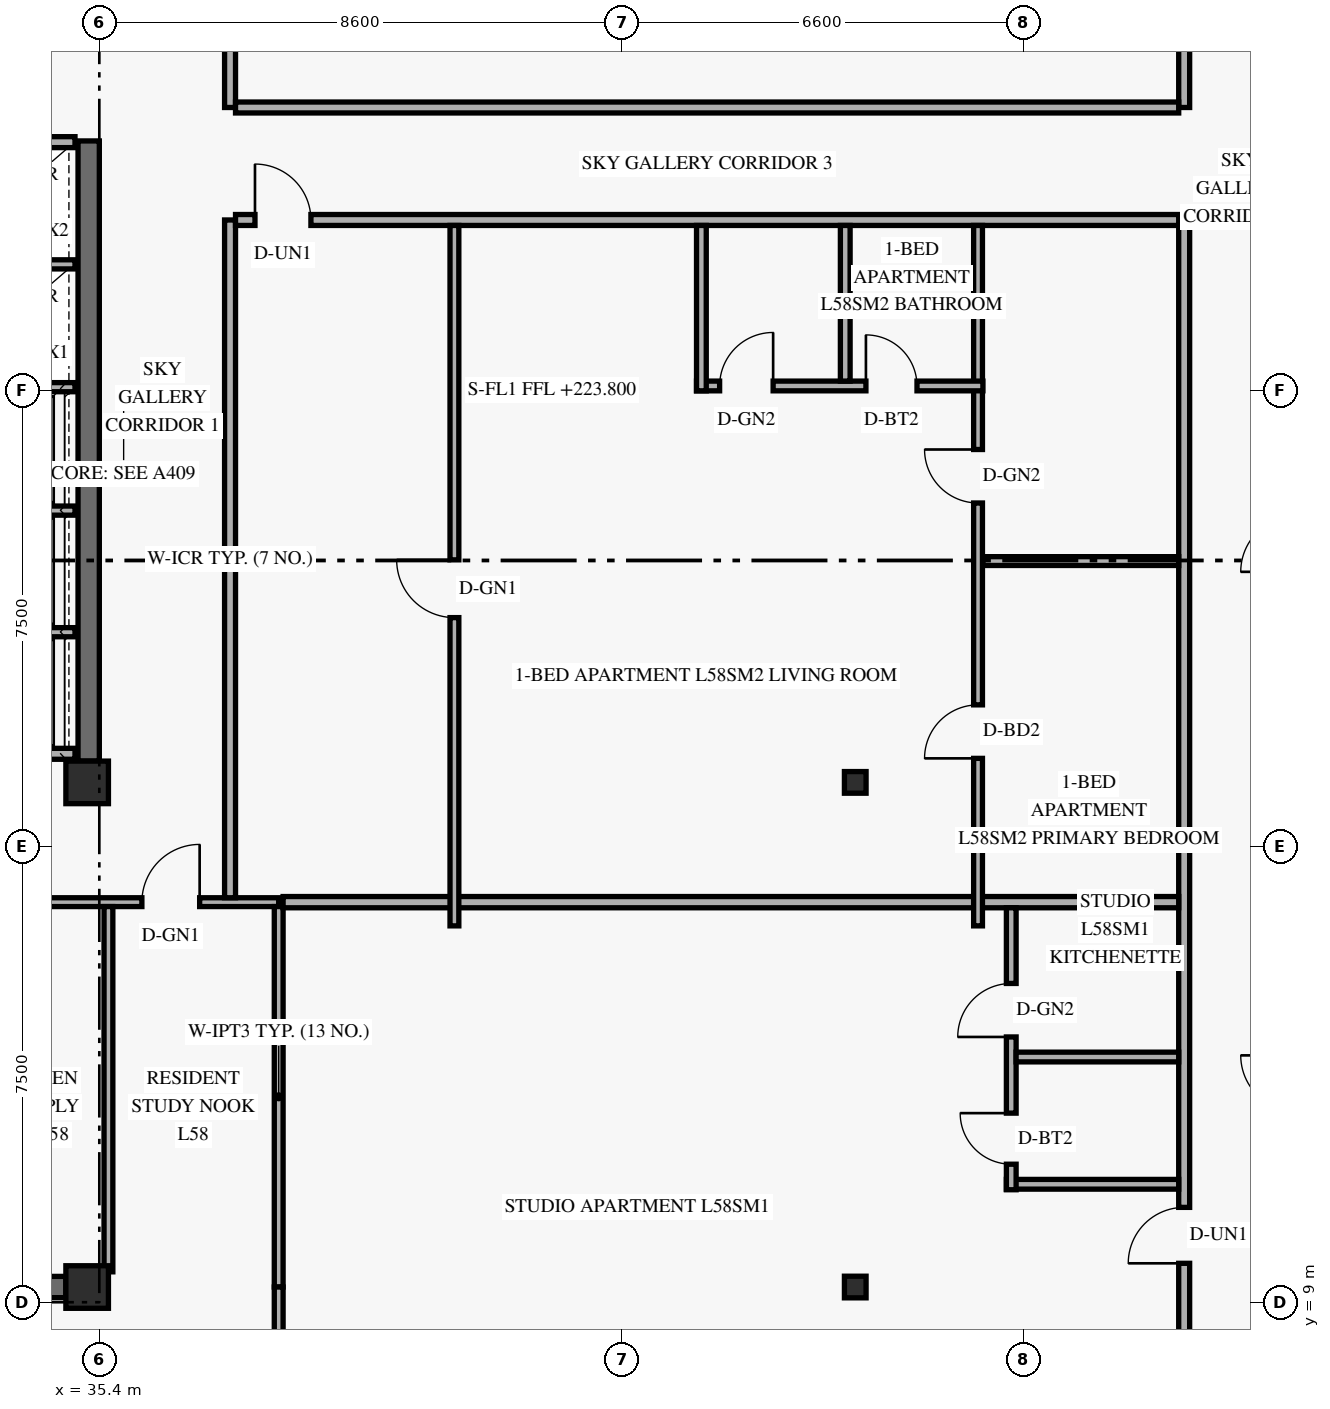
"""IFC4 building model, lengths in metres.
Left out: names, types, materials, properties, quantities, classifications, styles, units other than length and angle.
Written with IfcOpenShell. Run it as: python <this file> out.ifc"""

import sys

from ifc_helpers import new_model, si_unit, direction, frame, frame_2d, origin, origin_2d, place, context, subcontext, project, spatial, rectangle, hollow_rectangle, extrude, element, fill, save


model = new_model("IFC4")
c1 = context("Model", 3, precision=1e-05, world=origin(), true_north=direction((0.0, 1.0)))
c2 = subcontext(c1, "Body", "Model", "MODEL_VIEW")
j1 = project(units=[si_unit("LENGTHUNIT", "METRE"), si_unit("PLANEANGLEUNIT", "RADIAN")], contexts=[c1])
p1 = place(None, origin())
s1 = spatial("IfcSite", under=j1, at=p1, CompositionType="ELEMENT")
p2 = place(p1, origin())
s2 = spatial("IfcBuilding", under=s1, at=p2, CompositionType="ELEMENT")
p3 = place(p2, frame((0.0, 0.0, 223.8)))
s3 = spatial("IfcBuildingStorey", under=s2, at=p3, CompositionType="ELEMENT", Elevation=223.8)
p4 = place(p3, frame((35.225, 17.9, 0.0), z_axis=(0.0, 0.0, 1.0), x_axis=(0.0, 1.0, 0.0)))
e1 = element("IfcWall", 1, at=p4, inside=s3, PredefinedType="SHEAR", context=c2, shape_type="SweptSolid", body=[
    extrude(rectangle(XDim=10.2, YDim=0.35, at=frame_2d((5.1, 0.0))), origin(), (0.0, 0.0, 1.0), 2.821),
])
p5 = place(p3, frame((24.55, 9.25, 0.0), z_axis=(0.0, 0.0, 1.0), x_axis=(1.0, 0.0, 0.0)))
e2 = element("IfcWall", 2, at=p5, inside=s3, PredefinedType="SHEAR", context=c2, shape_type="SweptSolid", body=[
    extrude(rectangle(XDim=10.3, YDim=0.35, at=frame_2d((5.15, 0.0))), origin(), (0.0, 0.0, 1.0), 3.36),
])
p6 = place(p5, frame((5.2, 0.0, 0.0)))
e3 = element("IfcOpeningElement", 3, at=p6, cuts=e2, PredefinedType="OPENING", context=c2, shape_type="SweptSolid", body=[
    extrude(rectangle(XDim=0.95, YDim=2.15, at=frame_2d((0.475, 1.075))), frame((0.0, 0.185, 0.0), z_axis=(0.0, -1.0, 0.0), x_axis=(1.0, 0.0, 0.0)), (0.0, 0.0, 1.0), 0.37),
])
for number, where, z_axis, x_axis in (
    (4, (35.2, 9.25, 0.0), (0.0, 0.0, 1.0), (1.0, 0.0, 0.0)),
    (5, (35.2, 17.55, 0.0), (0.0, 0.0, 1.0), (1.0, 0.0, 0.0)),
):
    element("IfcColumn", number, at=place(p3, frame(where, z_axis=z_axis, x_axis=x_axis)), inside=s3, PredefinedType="COLUMN", context=c2, shape_type="SweptSolid", body=[
        extrude(rectangle(XDim=0.7, YDim=0.7, at=origin_2d()), origin(), (0.0, 0.0, 1.0), 3.6),
    ])
for number, where, z_axis, x_axis in (
    (6, (47.769, 9.25, 0.0), (0.035, 0.0, 0.999), (0.0, 1.0, 0.0)),
    (7, (47.769, 17.55, 0.0), (0.035, 0.0, 0.999), (0.0, 1.0, 0.0)),
):
    element("IfcColumn", number, at=place(p3, frame(where, z_axis=z_axis, x_axis=x_axis)), inside=s3, PredefinedType="COLUMN", context=c2, shape_type="SweptSolid", body=[
        extrude(hollow_rectangle(XDim=0.356, YDim=0.356, WallThickness=0.016, at=origin_2d()), origin(), (0.0, 0.0, 1.0), 3.602),
    ])
for number, where, z_axis, x_axis in (
    (8, (32.74, 18.02, 0.0), (0.0, 0.0, 1.0), (1.0, 0.0, 0.0)),
    (9, (32.74, 28.08, 0.0), (0.0, 0.0, 1.0), (1.0, 0.0, 0.0)),
):
    element("IfcWall", number, at=place(p3, frame(where, z_axis=z_axis, x_axis=x_axis)), inside=s3, PredefinedType="STANDARD", context=c2, shape_type="SweptSolid", body=[
        extrude(rectangle(XDim=2.26, YDim=0.18, at=frame_2d((1.13, 0.0))), origin(), (0.0, 0.0, 1.0), 3.36),
    ])
for number, where, z_axis, x_axis in (
    (10, (32.74, 20.02, 0.0), (0.0, 0.0, 1.0), (1.0, 0.0, 0.0)),
    (11, (32.74, 22.02, 0.0), (0.0, 0.0, 1.0), (1.0, 0.0, 0.0)),
    (12, (32.74, 24.05, 0.0), (0.0, 0.0, 1.0), (1.0, 0.0, 0.0)),
    (13, (32.74, 26.07, 0.0), (0.0, 0.0, 1.0), (1.0, 0.0, 0.0)),
):
    element("IfcWall", number, at=place(p3, frame(where, z_axis=z_axis, x_axis=x_axis)), inside=s3, PredefinedType="STANDARD", context=c2, shape_type="SweptSolid", body=[
        extrude(rectangle(XDim=2.26, YDim=0.15, at=frame_2d((1.13, 0.0))), origin(), (0.0, 0.0, 1.0), 3.36),
    ])
p7 = place(p3, frame((32.722, 15.58, 0.0), z_axis=(0.0, 0.0, 1.0), x_axis=(1.0, 0.0, 0.0)))
e14 = element("IfcWall", 14, at=p7, inside=s3, PredefinedType="PARTITIONING", context=c2, shape_type="SweptSolid", body=[
    extrude(rectangle(XDim=5.628, YDim=0.145, at=frame_2d((2.814, 0.0))), origin(), (0.0, 0.0, 1.0), 2.803),
])
p8 = place(p7, frame((0.778, 0.0, 0.0)))
e15 = element("IfcOpeningElement", 15, at=p8, cuts=e14, PredefinedType="OPENING", context=c2, shape_type="SweptSolid", body=[
    extrude(rectangle(XDim=0.9, YDim=2.1, at=frame_2d((0.45, 1.05))), frame((0.0, 0.083, 0.0), z_axis=(0.0, -1.0, 0.0), x_axis=(1.0, 0.0, 0.0)), (0.0, 0.0, 1.0), 0.165),
])
p9 = place(p7, frame((3.377, 0.0, 0.0)))
e16 = element("IfcOpeningElement", 16, at=p9, cuts=e14, PredefinedType="OPENING", context=c2, shape_type="SweptSolid", body=[
    extrude(rectangle(XDim=0.95, YDim=2.15, at=frame_2d((0.475, 1.075))), frame((0.0, 0.083, 0.0), z_axis=(0.0, -1.0, 0.0), x_axis=(1.0, 0.0, 0.0)), (0.0, 0.0, 1.0), 0.165),
])
p10 = place(p3, frame((38.35, 9.25, 0.0), z_axis=(0.0, 0.0, 1.0), x_axis=(0.0, 1.0, 0.0)))
e17 = element("IfcWall", 17, at=p10, inside=s3, PredefinedType="PARTITIONING", context=c2, shape_type="SweptSolid", body=[
    extrude(rectangle(XDim=6.258, YDim=0.145, at=frame_2d((3.129, 0.0))), origin(), (0.0, 0.0, 1.0), 2.803),
])
p11 = place(p3, frame((35.55, 9.5, 0.0), z_axis=(0.0, 0.0, 1.0), x_axis=(0.0, 1.0, 0.0)))
e18 = element("IfcWall", 18, at=p11, inside=s3, PredefinedType="PARTITIONING", context=c2, shape_type="SweptSolid", body=[
    extrude(rectangle(XDim=6.008, YDim=0.145, at=frame_2d((3.004, 0.0))), origin(), (0.0, 0.0, 1.0), 3.039),
])
p12 = place(p3, frame((37.55, 15.653, 0.0), z_axis=(0.0, 0.0, 1.0), x_axis=(0.0, 1.0, 0.0)))
e19 = element("IfcWall", 19, at=p12, inside=s3, PredefinedType="STANDARD", context=c2, shape_type="SweptSolid", body=[
    extrude(rectangle(XDim=11.147, YDim=0.18, at=frame_2d((5.574, 0.0))), origin(), (0.0, 0.0, 1.0), 2.803),
])
p13 = place(p3, frame((37.55, 28.65, 0.0), z_axis=(0.0, 0.0, 1.0), x_axis=(0.0, 1.0, 0.0)))
e20 = element("IfcWall", 20, at=p13, inside=s3, PredefinedType="STANDARD", context=c2, shape_type="SweptSolid", body=[
    extrude(rectangle(XDim=2.628, YDim=0.18, at=frame_2d((1.314, 0.0))), origin(), (0.0, 0.0, 1.0), 2.803),
])
p14 = place(p3, frame((53.242, 5.77, 0.0), z_axis=(0.0, 0.0, 1.0), x_axis=(0.0, 1.0, 0.0)))
e21 = element("IfcWall", 21, at=p14, inside=s3, PredefinedType="STANDARD", context=c2, shape_type="SweptSolid", body=[
    extrude(rectangle(XDim=21.03, YDim=0.18, at=frame_2d((10.515, 0.0))), origin(), (0.0, 0.0, 1.0), 2.803),
])
p15 = place(p14, frame((3.87, 0.0, 0.0)))
e22 = element("IfcOpeningElement", 22, at=p15, cuts=e21, PredefinedType="OPENING", context=c2, shape_type="SweptSolid", body=[
    extrude(rectangle(XDim=0.92, YDim=2.15, at=frame_2d((0.46, 1.075))), frame((0.0, 0.1, 0.0), z_axis=(0.0, -1.0, 0.0), x_axis=(1.0, 0.0, 0.0)), (0.0, 0.0, 1.0), 0.2),
])
p16 = place(p3, frame((53.242, 28.65, 0.0), z_axis=(0.0, 0.0, 1.0), x_axis=(0.0, 1.0, 0.0)))
e23 = element("IfcWall", 23, at=p16, inside=s3, PredefinedType="STANDARD", context=c2, shape_type="SweptSolid", body=[
    extrude(rectangle(XDim=13.58, YDim=0.18, at=frame_2d((6.79, 0.0))), origin(), (0.0, 0.0, 1.0), 2.803),
])
p17 = place(p16, frame((4.2, 0.0, 0.0)))
e24 = element("IfcOpeningElement", 24, at=p17, cuts=e23, PredefinedType="OPENING", context=c2, shape_type="SweptSolid", body=[
    extrude(rectangle(XDim=0.92, YDim=2.15, at=frame_2d((0.46, 1.075))), frame((0.0, 0.1, 0.0), z_axis=(0.0, -1.0, 0.0), x_axis=(1.0, 0.0, 0.0)), (0.0, 0.0, 1.0), 0.2),
])
p18 = place(p3, frame((37.64, 26.8, 0.0), z_axis=(0.0, 0.0, 1.0), x_axis=(1.0, 0.0, 0.0)))
e25 = element("IfcWall", 25, at=p18, inside=s3, PredefinedType="STANDARD", context=c2, shape_type="SweptSolid", body=[
    extrude(rectangle(XDim=15.512, YDim=0.18, at=frame_2d((7.756, 0.0))), origin(), (0.0, 0.0, 1.0), 2.803),
])
p19 = place(p18, frame((0.32, 0.0, 0.0)))
e26 = element("IfcOpeningElement", 26, at=p19, cuts=e25, PredefinedType="OPENING", context=c2, shape_type="SweptSolid", body=[
    extrude(rectangle(XDim=0.92, YDim=2.15, at=frame_2d((0.46, 1.075))), frame((0.0, 0.1, 0.0), z_axis=(0.0, -1.0, 0.0), x_axis=(1.0, 0.0, 0.0)), (0.0, 0.0, 1.0), 0.2),
])
p20 = place(p3, frame((37.64, 28.65, 0.0), z_axis=(0.0, 0.0, 1.0), x_axis=(1.0, 0.0, 0.0)))
e27 = element("IfcWall", 27, at=p20, inside=s3, PredefinedType="STANDARD", context=c2, shape_type="SweptSolid", body=[
    extrude(rectangle(XDim=15.512, YDim=0.18, at=frame_2d((7.756, 0.0))), origin(), (0.0, 0.0, 1.0), 2.803),
])
p21 = place(p3, frame((38.35, 5.77, 0.0), z_axis=(0.0, 0.0, 1.0), x_axis=(0.0, 1.0, 0.0)))
e28 = element("IfcWall", 28, at=p21, inside=s3, PredefinedType="PARTITIONING", context=c2, shape_type="SweptSolid", body=[
    extrude(rectangle(XDim=3.48, YDim=0.145, at=frame_2d((1.74, 0.0))), origin(), (0.0, 0.0, 1.0), 2.803),
])
p22 = place(p3, frame((38.423, 15.58, 0.0), z_axis=(0.0, 0.0, 1.0), x_axis=(1.0, 0.0, 0.0)))
e29 = element("IfcWall", 29, at=p22, inside=s3, PredefinedType="PARTITIONING", context=c2, shape_type="SweptSolid", body=[
    extrude(rectangle(XDim=14.729, YDim=0.185, at=frame_2d((7.365, 0.0))), origin(), (0.0, 0.0, 1.0), 2.803),
])
p23 = place(p3, frame((50.318, 10.94, 0.0), z_axis=(0.0, 0.0, 1.0), x_axis=(1.0, 0.0, 0.0)))
e30 = element("IfcWall", 30, at=p23, inside=s3, PredefinedType="PLUMBINGWALL", context=c2, shape_type="SweptSolid", body=[
    extrude(rectangle(XDim=2.834, YDim=0.16, at=frame_2d((1.417, 0.0))), origin(), (0.0, 0.0, 1.0), 3.36),
])
p24 = place(p3, frame((50.398, 10.85, 0.0), z_axis=(0.0, 0.0, 1.0), x_axis=(0.0, 1.0, 0.0)))
e31 = element("IfcWall", 31, at=p24, inside=s3, PredefinedType="PLUMBINGWALL", context=c2, shape_type="SweptSolid", body=[
    extrude(rectangle(XDim=4.637, YDim=0.16, at=frame_2d((2.319, 0.0))), origin(), (0.0, 0.0, 1.0), 3.039),
])
p25 = place(p24, frame((0.42, 0.0, 0.0)))
e32 = element("IfcOpeningElement", 32, at=p25, cuts=e31, PredefinedType="OPENING", context=c2, shape_type="SweptSolid", body=[
    extrude(rectangle(XDim=0.84, YDim=2.12, at=frame_2d((0.42, 1.06))), frame((0.0, 0.09, 0.0), z_axis=(0.0, -1.0, 0.0), x_axis=(1.0, 0.0, 0.0)), (0.0, 0.0, 1.0), 0.18),
])
p26 = place(p24, frame((2.513, 0.0, 0.0)))
e33 = element("IfcOpeningElement", 33, at=p26, cuts=e31, PredefinedType="OPENING", context=c2, shape_type="SweptSolid", body=[
    extrude(rectangle(XDim=0.88, YDim=2.12, at=frame_2d((0.44, 1.06))), frame((0.0, 0.09, 0.0), z_axis=(0.0, -1.0, 0.0), x_axis=(1.0, 0.0, 0.0)), (0.0, 0.0, 1.0), 0.18),
])
p27 = place(p3, frame((50.478, 13.033, 0.0), z_axis=(0.0, 0.0, 1.0), x_axis=(1.0, 0.0, 0.0)))
e34 = element("IfcWall", 34, at=p27, inside=s3, PredefinedType="PLUMBINGWALL", context=c2, shape_type="SweptSolid", body=[
    extrude(rectangle(XDim=2.674, YDim=0.16, at=frame_2d((1.337, 0.0))), origin(), (0.0, 0.0, 1.0), 3.36),
])
p28 = place(p3, frame((49.852, 15.19, 0.0), z_axis=(0.0, 0.0, 1.0), x_axis=(0.0, 1.0, 0.0)))
e35 = element("IfcWall", 35, at=p28, inside=s3, PredefinedType="PARTITIONING", context=c2, shape_type="SweptSolid", body=[
    extrude(rectangle(XDim=11.52, YDim=0.145, at=frame_2d((5.76, 0.0))), origin(), (0.0, 0.0, 1.0), 2.803),
])
p29 = place(p28, frame((2.755, 0.0, 0.0)))
e36 = element("IfcOpeningElement", 36, at=p29, cuts=e35, PredefinedType="OPENING", context=c2, shape_type="SweptSolid", body=[
    extrude(rectangle(XDim=0.88, YDim=2.14, at=frame_2d((0.44, 1.07))), frame((0.0, 0.083, 0.0), z_axis=(0.0, -1.0, 0.0), x_axis=(1.0, 0.0, 0.0)), (0.0, 0.0, 1.0), 0.165),
])
p30 = place(p28, frame((6.955, 0.0, 0.0)))
e37 = element("IfcOpeningElement", 37, at=p30, cuts=e35, PredefinedType="OPENING", context=c2, shape_type="SweptSolid", body=[
    extrude(rectangle(XDim=0.88, YDim=2.12, at=frame_2d((0.44, 1.06))), frame((0.0, 0.083, 0.0), z_axis=(0.0, -1.0, 0.0), x_axis=(1.0, 0.0, 0.0)), (0.0, 0.0, 1.0), 0.165),
])
p31 = place(p3, frame((45.222, 24.07, 0.0), z_axis=(0.0, 0.0, 1.0), x_axis=(1.0, 0.0, 0.0)))
e38 = element("IfcWall", 38, at=p31, inside=s3, PredefinedType="PLUMBINGWALL", context=c2, shape_type="SweptSolid", body=[
    extrude(rectangle(XDim=4.71, YDim=0.16, at=frame_2d((2.355, 0.0))), origin(), (0.0, 0.0, 1.0), 2.803),
])
p32 = place(p31, frame((0.38, 0.0, 0.0)))
e39 = element("IfcOpeningElement", 39, at=p32, cuts=e38, PredefinedType="OPENING", context=c2, shape_type="SweptSolid", body=[
    extrude(rectangle(XDim=0.88, YDim=2.12, at=frame_2d((0.44, 1.06))), frame((0.0, 0.09, 0.0), z_axis=(0.0, -1.0, 0.0), x_axis=(1.0, 0.0, 0.0)), (0.0, 0.0, 1.0), 0.18),
])
p33 = place(p31, frame((2.786, 0.0, 0.0)))
e40 = element("IfcOpeningElement", 40, at=p33, cuts=e38, PredefinedType="OPENING", context=c2, shape_type="SweptSolid", body=[
    extrude(rectangle(XDim=0.84, YDim=2.12, at=frame_2d((0.42, 1.06))), frame((0.0, 0.09, 0.0), z_axis=(0.0, -1.0, 0.0), x_axis=(1.0, 0.0, 0.0)), (0.0, 0.0, 1.0), 0.18),
])
p34 = place(p3, frame((45.302, 23.99, 0.0), z_axis=(0.0, 0.0, 1.0), x_axis=(0.0, 1.0, 0.0)))
e41 = element("IfcWall", 41, at=p34, inside=s3, PredefinedType="PLUMBINGWALL", context=c2, shape_type="SweptSolid", body=[
    extrude(rectangle(XDim=2.72, YDim=0.16, at=frame_2d((1.36, 0.0))), origin(), (0.0, 0.0, 1.0), 3.36),
])
p35 = place(p3, frame((47.667, 24.15, 0.0), z_axis=(0.0, 0.0, 1.0), x_axis=(0.0, 1.0, 0.0)))
e42 = element("IfcWall", 42, at=p35, inside=s3, PredefinedType="PLUMBINGWALL", context=c2, shape_type="SweptSolid", body=[
    extrude(rectangle(XDim=2.56, YDim=0.16, at=frame_2d((1.28, 0.0))), origin(), (0.0, 0.0, 1.0), 2.803),
])
p36 = place(p3, frame((41.24, 15.19, 0.0), z_axis=(0.0, 0.0, 1.0), x_axis=(0.0, 1.0, 0.0)))
e43 = element("IfcWall", 43, at=p36, inside=s3, PredefinedType="PARTITIONING", context=c2, shape_type="SweptSolid", body=[
    extrude(rectangle(XDim=11.52, YDim=0.145, at=frame_2d((5.76, 0.0))), origin(), (0.0, 0.0, 1.0), 2.803),
])
p37 = place(p36, frame((5.07, 0.0, 0.0)))
e44 = element("IfcOpeningElement", 44, at=p37, cuts=e43, PredefinedType="OPENING", context=c2, shape_type="SweptSolid", body=[
    extrude(rectangle(XDim=0.95, YDim=2.15, at=frame_2d((0.475, 1.075))), frame((0.0, 0.083, 0.0), z_axis=(0.0, -1.0, 0.0), x_axis=(1.0, 0.0, 0.0)), (0.0, 0.0, 1.0), 0.165),
])
p38 = place(p3, frame((49.932, 21.19, 0.0), z_axis=(0.0, 0.0, 1.0), x_axis=(1.0, 0.0, 0.0)))
e45 = element("IfcWall", 45, at=p38, inside=s3, PredefinedType="PARTITIONING", context=c2, shape_type="SweptSolid", body=[
    extrude(rectangle(XDim=3.22, YDim=0.145, at=frame_2d((1.61, 0.0))), origin(), (0.0, 0.0, 1.0), 2.803),
])
p39 = place(p9, origin())
e46 = element("IfcDoor", 46, at=p39, inside=s3, OperationType="SINGLE_SWING_RIGHT", PredefinedType="DOOR", context=c2, shape_type="SweptSolid", body=[
    extrude(rectangle(XDim=0.95, YDim=2.15, at=frame_2d((0.475, 1.075))), frame((0.0, 0.025, 0.0), z_axis=(0.0, -1.0, 0.0), x_axis=(1.0, 0.0, 0.0)), (0.0, 0.0, 1.0), 0.05),
])
fill(e16, e46)
p40 = place(p15, origin())
e47 = element("IfcDoor", 47, at=p40, inside=s3, OperationType="SINGLE_SWING_LEFT", PredefinedType="DOOR", context=c2, shape_type="SweptSolid", body=[
    extrude(rectangle(XDim=0.92, YDim=2.15, at=frame_2d((0.46, 1.075))), frame((0.0, 0.025, 0.0), z_axis=(0.0, -1.0, 0.0), x_axis=(1.0, 0.0, 0.0)), (0.0, 0.0, 1.0), 0.05),
])
fill(e22, e47)
p41 = place(p25, origin())
e48 = element("IfcDoor", 48, at=p41, inside=s3, OperationType="SINGLE_SWING_RIGHT", PredefinedType="DOOR", context=c2, shape_type="SweptSolid", body=[
    extrude(rectangle(XDim=0.84, YDim=2.12, at=frame_2d((0.42, 1.06))), frame((0.0, 0.025, 0.0), z_axis=(0.0, -1.0, 0.0), x_axis=(1.0, 0.0, 0.0)), (0.0, 0.0, 1.0), 0.05),
])
fill(e32, e48)
p42 = place(p26, origin())
e49 = element("IfcDoor", 49, at=p42, inside=s3, OperationType="SINGLE_SWING_LEFT", PredefinedType="DOOR", context=c2, shape_type="SweptSolid", body=[
    extrude(rectangle(XDim=0.88, YDim=2.12, at=frame_2d((0.44, 1.06))), frame((0.0, 0.025, 0.0), z_axis=(0.0, -1.0, 0.0), x_axis=(1.0, 0.0, 0.0)), (0.0, 0.0, 1.0), 0.05),
])
fill(e33, e49)
p43 = place(p37, origin())
e50 = element("IfcDoor", 50, at=p43, inside=s3, OperationType="SINGLE_SWING_RIGHT", PredefinedType="DOOR", context=c2, shape_type="SweptSolid", body=[
    extrude(rectangle(XDim=0.95, YDim=2.15, at=frame_2d((0.475, 1.075))), frame((0.0, 0.025, 0.0), z_axis=(0.0, -1.0, 0.0), x_axis=(1.0, 0.0, 0.0)), (0.0, 0.0, 1.0), 0.05),
])
fill(e44, e50)
p44 = place(p19, origin())
e51 = element("IfcDoor", 51, at=p44, inside=s3, OperationType="SINGLE_SWING_LEFT", PredefinedType="DOOR", context=c2, shape_type="SweptSolid", body=[
    extrude(rectangle(XDim=0.92, YDim=2.15, at=frame_2d((0.46, 1.075))), frame((0.0, 0.025, 0.0), z_axis=(0.0, -1.0, 0.0), x_axis=(1.0, 0.0, 0.0)), (0.0, 0.0, 1.0), 0.05),
])
fill(e26, e51)
p45 = place(p32, origin())
e52 = element("IfcDoor", 52, at=p45, inside=s3, OperationType="SINGLE_SWING_RIGHT", PredefinedType="DOOR", context=c2, shape_type="SweptSolid", body=[
    extrude(rectangle(XDim=0.88, YDim=2.12, at=frame_2d((0.44, 1.06))), frame((0.0, 0.025, 0.0), z_axis=(0.0, -1.0, 0.0), x_axis=(1.0, 0.0, 0.0)), (0.0, 0.0, 1.0), 0.05),
])
fill(e39, e52)
p46 = place(p33, origin())
e53 = element("IfcDoor", 53, at=p46, inside=s3, OperationType="SINGLE_SWING_LEFT", PredefinedType="DOOR", context=c2, shape_type="SweptSolid", body=[
    extrude(rectangle(XDim=0.84, YDim=2.12, at=frame_2d((0.42, 1.06))), frame((0.0, 0.025, 0.0), z_axis=(0.0, -1.0, 0.0), x_axis=(1.0, 0.0, 0.0)), (0.0, 0.0, 1.0), 0.05),
])
fill(e40, e53)
p47 = place(p29, origin())
e54 = element("IfcDoor", 54, at=p47, inside=s3, OperationType="SINGLE_SWING_LEFT", PredefinedType="DOOR", context=c2, shape_type="SweptSolid", body=[
    extrude(rectangle(XDim=0.88, YDim=2.14, at=frame_2d((0.44, 1.07))), frame((0.0, 0.025, 0.0), z_axis=(0.0, -1.0, 0.0), x_axis=(1.0, 0.0, 0.0)), (0.0, 0.0, 1.0), 0.05),
])
fill(e36, e54)
p48 = place(p30, origin())
e55 = element("IfcDoor", 55, at=p48, inside=s3, OperationType="SINGLE_SWING_RIGHT", PredefinedType="DOOR", context=c2, shape_type="SweptSolid", body=[
    extrude(rectangle(XDim=0.88, YDim=2.12, at=frame_2d((0.44, 1.06))), frame((0.0, 0.025, 0.0), z_axis=(0.0, -1.0, 0.0), x_axis=(1.0, 0.0, 0.0)), (0.0, 0.0, 1.0), 0.05),
])
fill(e37, e55)
save(model, sys.argv[1])
